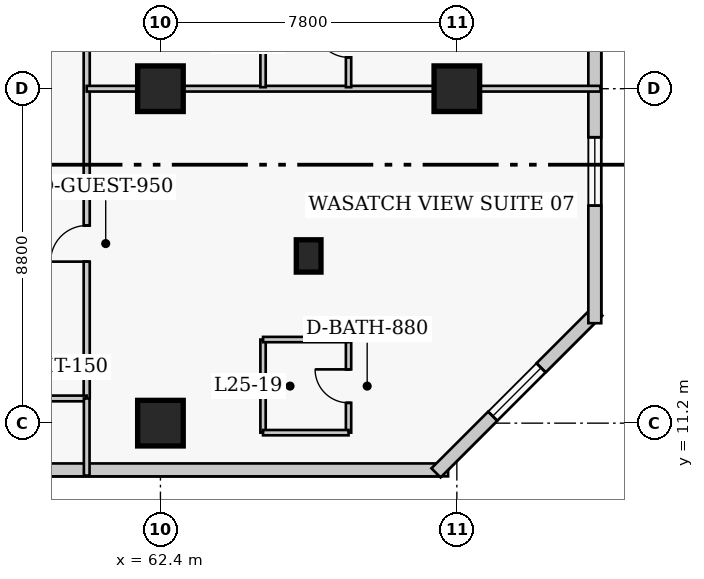
"""IFC4 building model, lengths in metres.
Left out: names, types, materials, properties, quantities, classifications, styles, units other than length and angle.
Written with IfcOpenShell. Run it as: python <this file> out.ifc"""

import sys

from ifc_helpers import new_model, si_unit, direction, frame, frame_2d, origin, origin_2d, place, context, subcontext, project, spatial, rectangle, extrude, element, fill, save


model = new_model("IFC4")
c1 = context("Model", 3, precision=1e-05, world=origin(), true_north=direction((0.0, 1.0)))
c2 = subcontext(c1, "Body", "Model", "MODEL_VIEW")
j1 = project(units=[si_unit("LENGTHUNIT", "METRE"), si_unit("PLANEANGLEUNIT", "RADIAN")], contexts=[c1])
p1 = place(None, origin())
s1 = spatial("IfcSite", under=j1, at=p1, CompositionType="ELEMENT")
p2 = place(p1, origin())
s2 = spatial("IfcBuilding", under=s1, at=p2, CompositionType="ELEMENT")
p3 = place(p2, frame((0.0, 0.0, 103.2)))
s3 = spatial("IfcBuildingStorey", under=s2, at=p3, CompositionType="ELEMENT", Elevation=103.2)
for number, where, z_axis, x_axis in (
    (1, (62.4, 11.2, 0.0), (0.0, 0.0, 1.0), (1.0, 0.0, 0.0)),
    (2, (62.4, 20.0, 0.0), (0.0, 0.0, 1.0), (1.0, 0.0, 0.0)),
    (3, (70.2, 20.0, 0.0), (0.0, 0.0, 1.0), (1.0, 0.0, 0.0)),
):
    element("IfcColumn", number, at=place(p3, frame(where, z_axis=z_axis, x_axis=x_axis)), inside=s3, PredefinedType="COLUMN", context=c2, shape_type="SweptSolid", body=[
        extrude(rectangle(XDim=1.2, YDim=1.2, at=origin_2d()), origin(), (0.0, 0.0, 1.0), 3.8),
    ])
p4 = place(p3, frame((66.3, 15.6, 0.0), z_axis=(0.0, 0.0, 1.0), x_axis=(1.0, 0.0, 0.0)))
e4 = element("IfcColumn", 4, at=p4, inside=s3, PredefinedType="PILASTER", context=c2, shape_type="SweptSolid", body=[
    extrude(rectangle(XDim=0.65, YDim=0.85, at=origin_2d()), origin(), (0.0, 0.0, 1.0), 3.8),
])
p5 = place(p3, frame((41.68, 9.97, 0.0), z_axis=(0.0, 0.0, 1.0), x_axis=(1.0, 0.0, 0.0)))
e5 = element("IfcWall", 5, at=p5, inside=s3, PredefinedType="SOLIDWALL", context=c2, shape_type="SweptSolid", body=[
    extrude(rectangle(XDim=28.29, YDim=0.34, at=frame_2d((14.145, 0.0))), origin(), (0.0, 0.0, 1.0), 3.54),
])
p6 = place(p5, frame((2.665, 0.0, 0.85)))
e6 = element("IfcOpeningElement", 6, at=p6, cuts=e5, PredefinedType="OPENING", context=c2, shape_type="SweptSolid", body=[
    extrude(rectangle(XDim=1.8, YDim=1.8, at=frame_2d((0.9, 0.9))), frame((0.0, 0.18, 0.0), z_axis=(0.0, -1.0, 0.0), x_axis=(1.0, 0.0, 0.0)), (0.0, 0.0, 1.0), 0.36),
])
p7 = place(p5, frame((13.895, 0.0, 0.85)))
e7 = element("IfcOpeningElement", 7, at=p7, cuts=e5, PredefinedType="OPENING", context=c2, shape_type="SweptSolid", body=[
    extrude(rectangle(XDim=1.8, YDim=1.8, at=frame_2d((0.9, 0.9))), frame((0.0, 0.18, 0.0), z_axis=(0.0, -1.0, 0.0), x_axis=(1.0, 0.0, 0.0)), (0.0, 0.0, 1.0), 0.36),
])
p8 = place(p5, frame((7.505, 0.0, 0.85)))
e8 = element("IfcOpeningElement", 8, at=p8, cuts=e5, PredefinedType="OPENING", context=c2, shape_type="SweptSolid", body=[
    extrude(rectangle(XDim=1.3, YDim=1.7, at=frame_2d((0.65, 0.85))), frame((0.0, 0.18, 0.0), z_axis=(0.0, -1.0, 0.0), x_axis=(1.0, 0.0, 0.0)), (0.0, 0.0, 1.0), 0.36),
])
p9 = place(p3, frame((69.652, 9.892, 0.0), z_axis=(0.0, 0.0, 1.0), x_axis=(0.707106781187, 0.707106781187, 0.0)))
e9 = element("IfcWall", 9, at=p9, inside=s3, PredefinedType="SOLIDWALL", context=c2, shape_type="SweptSolid", body=[
    extrude(rectangle(XDim=6.02, YDim=0.34, at=frame_2d((3.01, 0.0))), origin(), (0.0, 0.0, 1.0), 3.54),
])
p10 = place(p9, frame((2.11, 0.0, 0.85)))
e10 = element("IfcOpeningElement", 10, at=p10, cuts=e9, PredefinedType="OPENING", context=c2, shape_type="SweptSolid", body=[
    extrude(rectangle(XDim=1.8, YDim=1.8, at=frame_2d((0.9, 0.9))), frame((0.0, 0.18, 0.0), z_axis=(0.0, -1.0, 0.0), x_axis=(1.0, 0.0, 0.0)), (0.0, 0.0, 1.0), 0.36),
])
p11 = place(p3, frame((73.83, 13.83, 0.0), z_axis=(0.0, 0.0, 1.0), x_axis=(0.0, 1.0, 0.0)))
e11 = element("IfcWall", 11, at=p11, inside=s3, PredefinedType="SOLIDWALL", context=c2, shape_type="SweptSolid", body=[
    extrude(rectangle(XDim=31.94, YDim=0.34, at=frame_2d((15.97, 0.0))), origin(), (0.0, 0.0, 1.0), 3.54),
])
p12 = place(p11, frame((3.093, 0.0, 0.85)))
e12 = element("IfcOpeningElement", 12, at=p12, cuts=e11, PredefinedType="OPENING", context=c2, shape_type="SweptSolid", body=[
    extrude(rectangle(XDim=1.8, YDim=1.8, at=frame_2d((0.9, 0.9))), frame((0.0, 0.18, 0.0), z_axis=(0.0, -1.0, 0.0), x_axis=(1.0, 0.0, 0.0)), (0.0, 0.0, 1.0), 0.36),
])
p13 = place(p11, frame((11.077, 0.0, 0.85)))
e13 = element("IfcOpeningElement", 13, at=p13, cuts=e11, PredefinedType="OPENING", context=c2, shape_type="SweptSolid", body=[
    extrude(rectangle(XDim=1.8, YDim=1.8, at=frame_2d((0.9, 0.9))), frame((0.0, 0.18, 0.0), z_axis=(0.0, -1.0, 0.0), x_axis=(1.0, 0.0, 0.0)), (0.0, 0.0, 1.0), 0.36),
])
p14 = place(p11, frame((19.062, 0.0, 0.85)))
e14 = element("IfcOpeningElement", 14, at=p14, cuts=e11, PredefinedType="OPENING", context=c2, shape_type="SweptSolid", body=[
    extrude(rectangle(XDim=1.8, YDim=1.8, at=frame_2d((0.9, 0.9))), frame((0.0, 0.18, 0.0), z_axis=(0.0, -1.0, 0.0), x_axis=(1.0, 0.0, 0.0)), (0.0, 0.0, 1.0), 0.36),
])
p15 = place(p11, frame((27.048, 0.0, 0.85)))
e15 = element("IfcOpeningElement", 15, at=p15, cuts=e11, PredefinedType="OPENING", context=c2, shape_type="SweptSolid", body=[
    extrude(rectangle(XDim=1.8, YDim=1.8, at=frame_2d((0.9, 0.9))), frame((0.0, 0.18, 0.0), z_axis=(0.0, -1.0, 0.0), x_axis=(1.0, 0.0, 0.0)), (0.0, 0.0, 1.0), 0.36),
])
p16 = place(p3, frame((60.46, 11.85, 0.0), z_axis=(0.0, 0.0, 1.0), x_axis=(0.0, 1.0, 0.0)))
e16 = element("IfcWall", 16, at=p16, inside=s3, PredefinedType="PARTITIONING", context=c2, shape_type="SweptSolid", body=[
    extrude(rectangle(XDim=28.8, YDim=0.16, at=frame_2d((14.4, 0.0))), origin(), (0.0, 0.0, 1.0), 3.54),
])
p17 = place(p16, frame((3.6, 0.0, 0.0)))
e17 = element("IfcOpeningElement", 17, at=p17, cuts=e16, PredefinedType="OPENING", context=c2, shape_type="SweptSolid", body=[
    extrude(rectangle(XDim=0.95, YDim=2.1, at=frame_2d((0.475, 1.05))), frame((0.0, 0.09, 0.0), z_axis=(0.0, -1.0, 0.0), x_axis=(1.0, 0.0, 0.0)), (0.0, 0.0, 1.0), 0.18),
])
p18 = place(p16, frame((12.075, 0.0, 0.0)))
e18 = element("IfcOpeningElement", 18, at=p18, cuts=e16, PredefinedType="OPENING", context=c2, shape_type="SweptSolid", body=[
    extrude(rectangle(XDim=0.95, YDim=2.1, at=frame_2d((0.475, 1.05))), frame((0.0, 0.09, 0.0), z_axis=(0.0, -1.0, 0.0), x_axis=(1.0, 0.0, 0.0)), (0.0, 0.0, 1.0), 0.18),
])
p19 = place(p16, frame((19.875, 0.0, 0.0)))
e19 = element("IfcOpeningElement", 19, at=p19, cuts=e16, PredefinedType="OPENING", context=c2, shape_type="SweptSolid", body=[
    extrude(rectangle(XDim=0.95, YDim=2.1, at=frame_2d((0.475, 1.05))), frame((0.0, 0.09, 0.0), z_axis=(0.0, -1.0, 0.0), x_axis=(1.0, 0.0, 0.0)), (0.0, 0.0, 1.0), 0.18),
])
p20 = place(p16, frame((24.3, 0.0, 0.0)))
e20 = element("IfcOpeningElement", 20, at=p20, cuts=e16, PredefinedType="OPENING", context=c2, shape_type="SweptSolid", body=[
    extrude(rectangle(XDim=1.0, YDim=2.15, at=frame_2d((0.5, 1.075))), frame((0.0, 0.09, 0.0), z_axis=(0.0, -1.0, 0.0), x_axis=(1.0, 0.0, 0.0)), (0.0, 0.0, 1.0), 0.18),
])
p21 = place(p3, frame((58.24, 11.85, 0.0), z_axis=(0.0, 0.0, 1.0), x_axis=(1.0, 0.0, 0.0)))
e21 = element("IfcWall", 21, at=p21, inside=s3, PredefinedType="PARTITIONING", context=c2, shape_type="SweptSolid", body=[
    extrude(rectangle(XDim=2.22, YDim=0.15, at=frame_2d((1.11, 0.0))), origin(), (0.0, 0.0, 1.0), 3.54),
])
p22 = place(p3, frame((60.46, 9.82, 0.0), z_axis=(0.0, 0.0, 1.0), x_axis=(0.0, 1.0, 0.0)))
e22 = element("IfcWall", 22, at=p22, inside=s3, PredefinedType="PARTITIONING", context=c2, shape_type="SweptSolid", body=[
    extrude(rectangle(XDim=2.03, YDim=0.15, at=frame_2d((1.015, 0.0))), origin(), (0.0, 0.0, 1.0), 3.54),
])
p23 = place(p3, frame((65.1, 10.95, 0.0), z_axis=(0.0, 0.0, 1.0), x_axis=(0.0, 1.0, 0.0)))
e23 = element("IfcWall", 23, at=p23, inside=s3, PredefinedType="PLUMBINGWALL", context=c2, shape_type="SweptSolid", body=[
    extrude(rectangle(XDim=2.45, YDim=0.14, at=frame_2d((1.225, 0.0))), origin(), (0.0, 0.0, 1.0), 3.54),
])
p24 = place(p3, frame((67.35, 10.95, 0.0), z_axis=(0.0, 0.0, 1.0), x_axis=(0.0, 1.0, 0.0)))
e24 = element("IfcWall", 24, at=p24, inside=s3, PredefinedType="PLUMBINGWALL", context=c2, shape_type="SweptSolid", body=[
    extrude(rectangle(XDim=2.45, YDim=0.14, at=frame_2d((1.225, 0.0))), origin(), (0.0, 0.0, 1.0), 3.54),
])
p25 = place(p24, frame((0.785, 0.0, 0.0)))
e25 = element("IfcOpeningElement", 25, at=p25, cuts=e24, PredefinedType="OPENING", context=c2, shape_type="SweptSolid", body=[
    extrude(rectangle(XDim=0.88, YDim=2.05, at=frame_2d((0.44, 1.025))), frame((0.0, 0.08, 0.0), z_axis=(0.0, -1.0, 0.0), x_axis=(1.0, 0.0, 0.0)), (0.0, 0.0, 1.0), 0.16),
])
for number, where, z_axis, x_axis in (
    (26, (65.1, 10.95, 0.0), (0.0, 0.0, 1.0), (1.0, 0.0, 0.0)),
    (27, (65.1, 13.4, 0.0), (0.0, 0.0, 1.0), (1.0, 0.0, 0.0)),
):
    element("IfcWall", number, at=place(p3, frame(where, z_axis=z_axis, x_axis=x_axis)), inside=s3, PredefinedType="PLUMBINGWALL", context=c2, shape_type="SweptSolid", body=[
        extrude(rectangle(XDim=2.25, YDim=0.14, at=frame_2d((1.125, 0.0))), origin(), (0.0, 0.0, 1.0), 3.54),
    ])
p26 = place(p3, frame((60.46, 20.0, 0.0), z_axis=(0.0, 0.0, 1.0), x_axis=(1.0, 0.0, 0.0)))
e28 = element("IfcWall", 28, at=p26, inside=s3, PredefinedType="PARTITIONING", context=c2, shape_type="SweptSolid", body=[
    extrude(rectangle(XDim=13.52, YDim=0.15, at=frame_2d((6.76, 0.0))), origin(), (0.0, 0.0, 1.0), 2.679),
])
p27 = place(p3, frame((65.1, 20.04, 0.0), z_axis=(0.0, 0.0, 1.0), x_axis=(0.0, 1.0, 0.0)))
e29 = element("IfcWall", 29, at=p27, inside=s3, PredefinedType="PLUMBINGWALL", context=c2, shape_type="SweptSolid", body=[
    extrude(rectangle(XDim=2.45, YDim=0.14, at=frame_2d((1.225, 0.0))), origin(), (0.0, 0.0, 1.0), 3.54),
])
p28 = place(p3, frame((67.35, 20.04, 0.0), z_axis=(0.0, 0.0, 1.0), x_axis=(0.0, 1.0, 0.0)))
e30 = element("IfcWall", 30, at=p28, inside=s3, PredefinedType="PLUMBINGWALL", context=c2, shape_type="SweptSolid", body=[
    extrude(rectangle(XDim=2.45, YDim=0.14, at=frame_2d((1.225, 0.0))), origin(), (0.0, 0.0, 1.0), 3.54),
])
p29 = place(p28, frame((0.785, 0.0, 0.0)))
e31 = element("IfcOpeningElement", 31, at=p29, cuts=e30, PredefinedType="OPENING", context=c2, shape_type="SweptSolid", body=[
    extrude(rectangle(XDim=0.88, YDim=2.05, at=frame_2d((0.44, 1.025))), frame((0.0, 0.08, 0.0), z_axis=(0.0, -1.0, 0.0), x_axis=(1.0, 0.0, 0.0)), (0.0, 0.0, 1.0), 0.16),
])
p30 = place(p10, origin())
e32 = element("IfcWindow", 32, at=p30, inside=s3, PartitioningType="SINGLE_PANEL", PredefinedType="WINDOW", context=c2, shape_type="SweptSolid", body=[
    extrude(rectangle(XDim=1.8, YDim=1.8, at=frame_2d((0.9, 0.9))), frame((0.0, 0.03, 0.0), z_axis=(0.0, -1.0, 0.0), x_axis=(1.0, 0.0, 0.0)), (0.0, 0.0, 1.0), 0.06),
])
fill(e10, e32)
p31 = place(p12, origin())
e33 = element("IfcWindow", 33, at=p31, inside=s3, PartitioningType="SINGLE_PANEL", PredefinedType="WINDOW", context=c2, shape_type="SweptSolid", body=[
    extrude(rectangle(XDim=1.8, YDim=1.8, at=frame_2d((0.9, 0.9))), frame((0.0, 0.03, 0.0), z_axis=(0.0, -1.0, 0.0), x_axis=(1.0, 0.0, 0.0)), (0.0, 0.0, 1.0), 0.06),
])
fill(e12, e33)
p32 = place(p25, origin())
e34 = element("IfcDoor", 34, at=p32, inside=s3, OperationType="SINGLE_SWING_RIGHT", PredefinedType="DOOR", context=c2, shape_type="SweptSolid", body=[
    extrude(rectangle(XDim=0.88, YDim=2.05, at=frame_2d((0.44, 1.025))), frame((0.0, 0.025, 0.0), z_axis=(0.0, -1.0, 0.0), x_axis=(1.0, 0.0, 0.0)), (0.0, 0.0, 1.0), 0.05),
])
fill(e25, e34)
p33 = place(p17, origin())
e35 = element("IfcDoor", 35, at=p33, inside=s3, OperationType="SINGLE_SWING_LEFT", PredefinedType="DOOR", context=c2, shape_type="SweptSolid", body=[
    extrude(rectangle(XDim=0.95, YDim=2.1, at=frame_2d((0.475, 1.05))), frame((0.0, 0.025, 0.0), z_axis=(0.0, -1.0, 0.0), x_axis=(1.0, 0.0, 0.0)), (0.0, 0.0, 1.0), 0.05),
])
fill(e17, e35)
p34 = place(p29, origin())
e36 = element("IfcDoor", 36, at=p34, inside=s3, OperationType="SINGLE_SWING_RIGHT", PredefinedType="DOOR", context=c2, shape_type="SweptSolid", body=[
    extrude(rectangle(XDim=0.88, YDim=2.05, at=frame_2d((0.44, 1.025))), frame((0.0, 0.025, 0.0), z_axis=(0.0, -1.0, 0.0), x_axis=(1.0, 0.0, 0.0)), (0.0, 0.0, 1.0), 0.05),
])
fill(e31, e36)
save(model, sys.argv[1])
